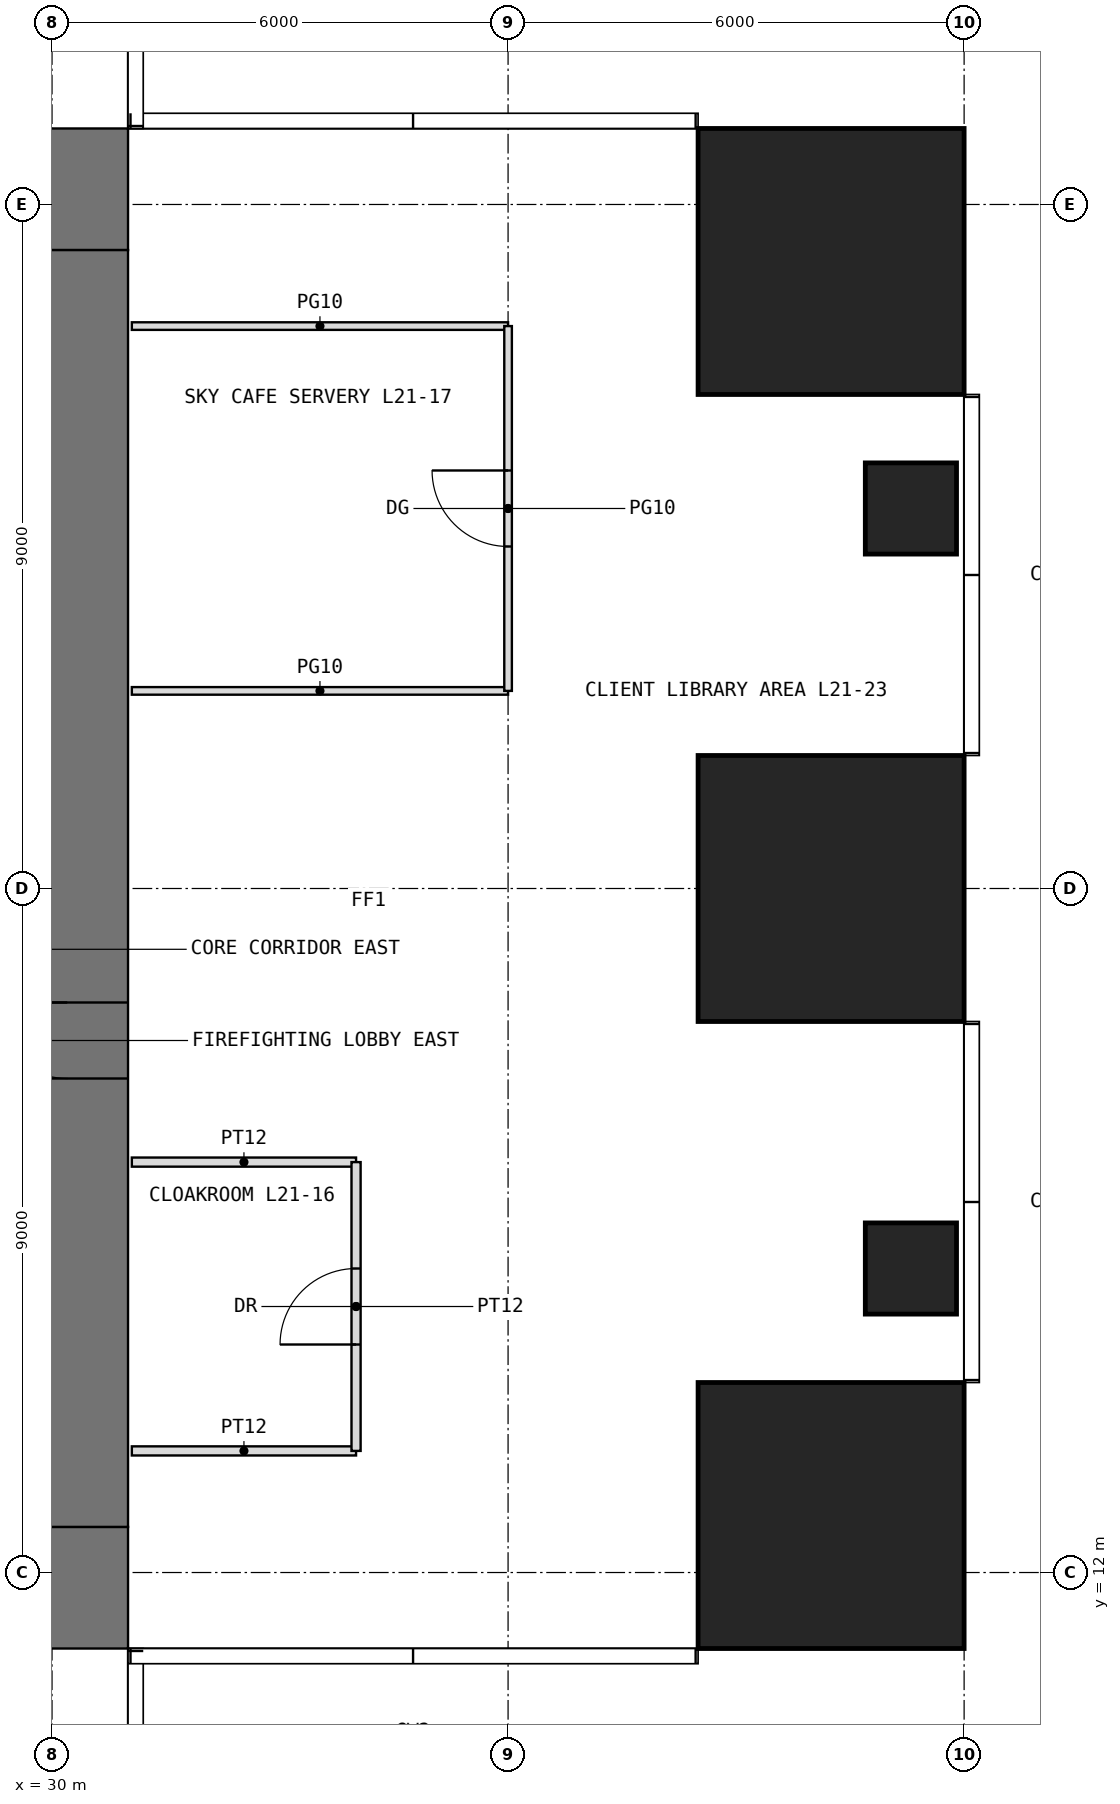
"""IFC4 building model, lengths in metres.
Left out: names, types, materials, properties, quantities, classifications, styles, units other than length and angle.
Written with IfcOpenShell. Run it as: python <this file> out.ifc"""

import sys

from ifc_helpers import new_model, si_unit, direction, frame, frame_2d, origin, origin_2d, place, context, subcontext, project, spatial, rectangle, extrude, element, fill, save


model = new_model("IFC4")
c1 = context("Model", 3, precision=1e-05, world=origin(), true_north=direction((0.0, 1.0)))
c2 = subcontext(c1, "Body", "Model", "MODEL_VIEW")
j1 = project(units=[si_unit("LENGTHUNIT", "METRE"), si_unit("PLANEANGLEUNIT", "RADIAN")], contexts=[c1])
p1 = place(None, origin())
s1 = spatial("IfcSite", under=j1, at=p1, CompositionType="ELEMENT")
p2 = place(p1, origin())
s2 = spatial("IfcBuilding", under=s1, at=p2, CompositionType="ELEMENT")
p3 = place(p2, frame((0.0, 0.0, 91.5)))
s3 = spatial("IfcBuildingStorey", under=s2, at=p3, CompositionType="ELEMENT", Elevation=91.5)
p4 = place(p3, frame((40.25, 12.75, 0.0), z_axis=(0.0, 0.0, 1.0), x_axis=(1.0, 0.0, 0.0)))
e1 = element("IfcColumn", 1, at=p4, inside=s3, PredefinedType="COLUMN", context=c2, shape_type="SweptSolid", body=[
    extrude(rectangle(XDim=3.5, YDim=3.5, at=origin_2d()), origin(), (0.0, 0.0, 1.0), 5.0),
])
p5 = place(p3, frame((41.3, 16.0, 0.0), z_axis=(0.0, 0.0, 1.0), x_axis=(1.0, 0.0, 0.0)))
e2 = element("IfcColumn", 2, at=p5, inside=s3, PredefinedType="COLUMN", context=c2, shape_type="SweptSolid", body=[
    extrude(rectangle(XDim=1.2, YDim=1.2, at=origin_2d()), origin(), (0.0, 0.0, 1.0), 5.0),
])
p6 = place(p3, frame((40.25, 21.0, 0.0), z_axis=(0.0, 0.0, 1.0), x_axis=(1.0, 0.0, 0.0)))
e3 = element("IfcColumn", 3, at=p6, inside=s3, PredefinedType="COLUMN", context=c2, shape_type="SweptSolid", body=[
    extrude(rectangle(XDim=3.5, YDim=3.5, at=origin_2d()), origin(), (0.0, 0.0, 1.0), 5.0),
])
p7 = place(p3, frame((41.3, 26.0, 0.0), z_axis=(0.0, 0.0, 1.0), x_axis=(1.0, 0.0, 0.0)))
e4 = element("IfcColumn", 4, at=p7, inside=s3, PredefinedType="COLUMN", context=c2, shape_type="SweptSolid", body=[
    extrude(rectangle(XDim=1.2, YDim=1.2, at=origin_2d()), origin(), (0.0, 0.0, 1.0), 5.0),
])
p8 = place(p3, frame((40.25, 29.25, 0.0), z_axis=(0.0, 0.0, 1.0), x_axis=(1.0, 0.0, 0.0)))
e5 = element("IfcColumn", 5, at=p8, inside=s3, PredefinedType="COLUMN", context=c2, shape_type="SweptSolid", body=[
    extrude(rectangle(XDim=3.5, YDim=3.5, at=origin_2d()), origin(), (0.0, 0.0, 1.0), 5.0),
])
p9 = place(p3, frame((11.0, 11.8, -0.05), z_axis=(0.0, 0.0, 1.0), x_axis=(1.0, 0.0, 0.0)))
e6 = element("IfcWall", 6, at=p9, inside=s3, PredefinedType="SHEAR", context=c2, shape_type="SweptSolid", body=[
    extrude(rectangle(XDim=20.0, YDim=1.6, at=frame_2d((10.0, 0.0))), origin(), (0.0, 0.0, 1.0), 5.0),
])
p10 = place(p9, frame((9.0, 0.0, 0.05)))
e7 = element("IfcOpeningElement", 7, at=p10, cuts=e6, PredefinedType="OPENING", context=c2, shape_type="SweptSolid", body=[
    extrude(rectangle(XDim=2.0, YDim=2.2, at=frame_2d((1.0, 1.1))), frame((0.0, 0.81, 0.0), z_axis=(0.0, -1.0, 0.0), x_axis=(1.0, 0.0, 0.0)), (0.0, 0.0, 1.0), 1.62),
])
p11 = place(p3, frame((11.0, 30.2, -0.05), z_axis=(0.0, 0.0, 1.0), x_axis=(1.0, 0.0, 0.0)))
e8 = element("IfcWall", 8, at=p11, inside=s3, PredefinedType="SHEAR", context=c2, shape_type="SweptSolid", body=[
    extrude(rectangle(XDim=20.0, YDim=1.6, at=frame_2d((10.0, 0.0))), origin(), (0.0, 0.0, 1.0), 5.0),
])
p12 = place(p11, frame((9.0, 0.0, 0.05)))
e9 = element("IfcOpeningElement", 9, at=p12, cuts=e8, PredefinedType="OPENING", context=c2, shape_type="SweptSolid", body=[
    extrude(rectangle(XDim=2.0, YDim=2.2, at=frame_2d((1.0, 1.1))), frame((0.0, 0.81, 0.0), z_axis=(0.0, -1.0, 0.0), x_axis=(1.0, 0.0, 0.0)), (0.0, 0.0, 1.0), 1.62),
])
p13 = place(p3, frame((30.2, 12.6, -0.05), z_axis=(0.0, 0.0, 1.0), x_axis=(0.0, 1.0, 0.0)))
e10 = element("IfcWall", 10, at=p13, inside=s3, PredefinedType="SHEAR", context=c2, shape_type="SweptSolid", body=[
    extrude(rectangle(XDim=16.8, YDim=1.6, at=frame_2d((8.4, 0.0))), origin(), (0.0, 0.0, 1.0), 5.0),
])
p14 = place(p13, frame((5.9, 0.0, 0.05)))
e11 = element("IfcOpeningElement", 11, at=p14, cuts=e10, PredefinedType="OPENING", context=c2, shape_type="SweptSolid", body=[
    extrude(rectangle(XDim=1.0, YDim=2.2, at=frame_2d((0.5, 1.1))), frame((0.0, 0.81, 0.0), z_axis=(0.0, -1.0, 0.0), x_axis=(1.0, 0.0, 0.0)), (0.0, 0.0, 1.0), 1.62),
])
for number, where, z_axis, x_axis in (
    (12, (31.05, 13.6, 0.0), (0.0, 0.0, 1.0), (1.0, 0.0, 0.0)),
    (13, (31.05, 17.4, 0.0), (0.0, 0.0, 1.0), (1.0, 0.0, 0.0)),
):
    element("IfcWall", number, at=place(p3, frame(where, z_axis=z_axis, x_axis=x_axis)), inside=s3, PredefinedType="PARTITIONING", context=c2, shape_type="SweptSolid", body=[
        extrude(rectangle(XDim=2.95, YDim=0.12, at=frame_2d((1.475, 0.0))), origin(), (0.0, 0.0, 1.0), 4.75),
    ])
for number, where, z_axis, x_axis in (
    (14, (31.05, 23.6, 0.0), (0.0, 0.0, 1.0), (1.0, 0.0, 0.0)),
    (15, (31.05, 28.4, 0.0), (0.0, 0.0, 1.0), (1.0, 0.0, 0.0)),
):
    element("IfcWall", number, at=place(p3, frame(where, z_axis=z_axis, x_axis=x_axis)), inside=s3, PredefinedType="PARTITIONING", context=c2, shape_type="SweptSolid", body=[
        extrude(rectangle(XDim=4.95, YDim=0.1, at=frame_2d((2.475, 0.0))), origin(), (0.0, 0.0, 1.0), 4.75),
    ])
p15 = place(p3, frame((34.0, 13.6, 0.0), z_axis=(0.0, 0.0, 1.0), x_axis=(0.0, 1.0, 0.0)))
e16 = element("IfcWall", 16, at=p15, inside=s3, PredefinedType="PARTITIONING", context=c2, shape_type="SweptSolid", body=[
    extrude(rectangle(XDim=3.8, YDim=0.12, at=frame_2d((1.9, 0.0))), origin(), (0.0, 0.0, 1.0), 4.75),
])
p16 = place(p15, frame((1.4, 0.0, 0.0)))
e17 = element("IfcOpeningElement", 17, at=p16, cuts=e16, PredefinedType="OPENING", context=c2, shape_type="SweptSolid", body=[
    extrude(rectangle(XDim=1.0, YDim=2.2, at=frame_2d((0.5, 1.1))), frame((0.0, 0.07, 0.0), z_axis=(0.0, -1.0, 0.0), x_axis=(1.0, 0.0, 0.0)), (0.0, 0.0, 1.0), 0.14),
])
p17 = place(p3, frame((36.0, 23.6, 0.0), z_axis=(0.0, 0.0, 1.0), x_axis=(0.0, 1.0, 0.0)))
e18 = element("IfcWall", 18, at=p17, inside=s3, PredefinedType="PARTITIONING", context=c2, shape_type="SweptSolid", body=[
    extrude(rectangle(XDim=4.8, YDim=0.1, at=frame_2d((2.4, 0.0))), origin(), (0.0, 0.0, 1.0), 4.75),
])
p18 = place(p17, frame((1.9, 0.0, 0.0)))
e19 = element("IfcOpeningElement", 19, at=p18, cuts=e18, PredefinedType="OPENING", context=c2, shape_type="SweptSolid", body=[
    extrude(rectangle(XDim=1.0, YDim=2.4, at=frame_2d((0.5, 1.2))), frame((0.0, 0.06, 0.0), z_axis=(0.0, -1.0, 0.0), x_axis=(1.0, 0.0, 0.0)), (0.0, 0.0, 1.0), 0.12),
])
p19 = place(p14, origin())
e20 = element("IfcDoor", 20, at=p19, inside=s3, OperationType="SINGLE_SWING_RIGHT", PredefinedType="DOOR", context=c2, shape_type="SweptSolid", body=[
    extrude(rectangle(XDim=1.0, YDim=2.2, at=frame_2d((0.5, 1.1))), frame((0.0, 0.025, 0.0), z_axis=(0.0, -1.0, 0.0), x_axis=(1.0, 0.0, 0.0)), (0.0, 0.0, 1.0), 0.05),
])
fill(e11, e20)
p20 = place(p16, origin())
e21 = element("IfcDoor", 21, at=p20, inside=s3, OperationType="SINGLE_SWING_LEFT", PredefinedType="DOOR", context=c2, shape_type="SweptSolid", body=[
    extrude(rectangle(XDim=1.0, YDim=2.2, at=frame_2d((0.5, 1.1))), frame((0.0, 0.025, 0.0), z_axis=(0.0, -1.0, 0.0), x_axis=(1.0, 0.0, 0.0)), (0.0, 0.0, 1.0), 0.05),
])
fill(e17, e21)
p21 = place(p18, origin())
e22 = element("IfcDoor", 22, at=p21, inside=s3, OperationType="SINGLE_SWING_RIGHT", PredefinedType="DOOR", context=c2, shape_type="SweptSolid", body=[
    extrude(rectangle(XDim=1.0, YDim=2.4, at=frame_2d((0.5, 1.2))), frame((0.0, 0.025, 0.0), z_axis=(0.0, -1.0, 0.0), x_axis=(1.0, 0.0, 0.0)), (0.0, 0.0, 1.0), 0.05),
])
fill(e19, e22)
save(model, sys.argv[1])
